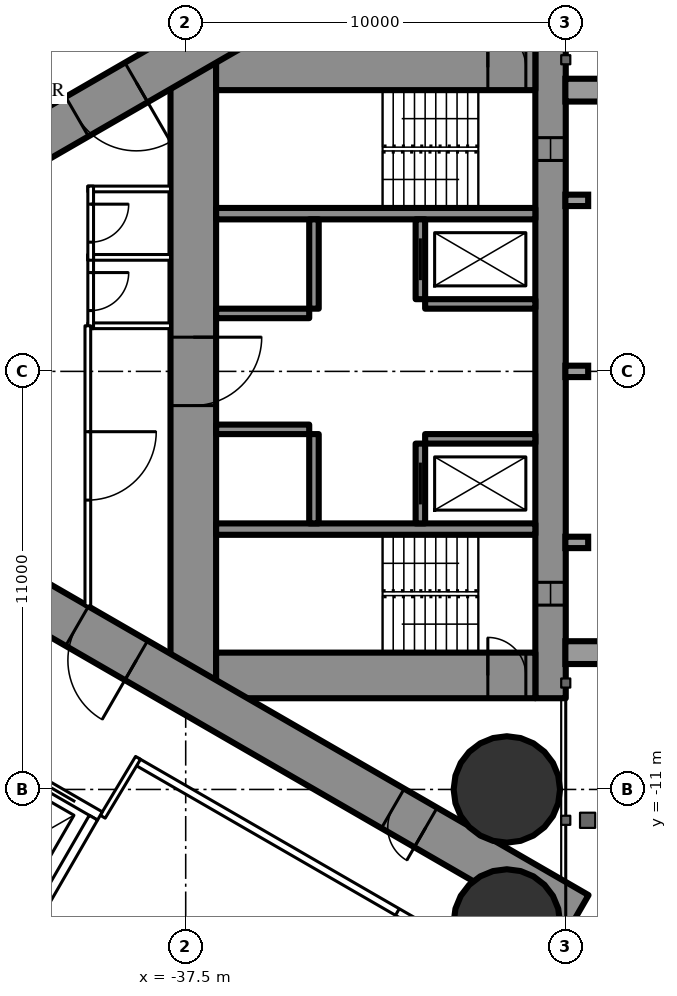
"""IFC4 building model, lengths in metres.
Left out: names, types, materials, properties, quantities, classifications, styles, units other than length and angle.
Written with IfcOpenShell. Run it as: python <this file> out.ifc"""

import sys

from ifc_helpers import new_model, si_unit, direction, frame, frame_2d, origin, origin_2d, place, context, subcontext, project, spatial, rectangle, circle, extrude, element, fill, save


model = new_model("IFC4")
c1 = context("Model", 3, precision=1e-05, world=origin(), true_north=direction((0.0, 1.0)))
c2 = subcontext(c1, "Body", "Model", "MODEL_VIEW")
j1 = project(units=[si_unit("LENGTHUNIT", "METRE"), si_unit("PLANEANGLEUNIT", "RADIAN")], contexts=[c1])
p1 = place(None, origin())
s1 = spatial("IfcSite", under=j1, at=p1, CompositionType="ELEMENT")
p2 = place(p1, origin())
s2 = spatial("IfcBuilding", under=s1, at=p2, CompositionType="ELEMENT")
p3 = place(p2, frame((0.0, 0.0, 166.8)))
s3 = spatial("IfcBuildingStorey", under=s2, at=p3, CompositionType="ELEMENT", Elevation=166.8)
for number, where, z_axis, x_axis in (
    (1, (-29.05, -11.0, 0.0), (0.0, 0.0, 1.0), (1.0, 0.0, 0.0)),
    (2, (-29.05, -14.5, 0.0), (0.0, 0.0, 1.0), (1.0, 0.0, 0.0)),
):
    element("IfcColumn", number, at=place(p3, frame(where, z_axis=z_axis, x_axis=x_axis)), inside=s3, PredefinedType="COLUMN", context=c2, shape_type="SweptSolid", body=[
        extrude(circle(Radius=1.4, at=origin_2d()), origin(), (0.0, 0.0, 1.0), 3.5),
    ])
p4 = place(p3, frame((-27.9, 8.6, 0.0), z_axis=(0.0, 0.0, 1.0), x_axis=(0.0, -1.0, 0.0)))
e3 = element("IfcWall", 3, at=p4, inside=s3, PredefinedType="SHEAR", context=c2, shape_type="SweptSolid", body=[
    extrude(rectangle(XDim=17.2, YDim=0.8, at=frame_2d((8.6, 0.0))), origin(), (0.0, 0.0, 1.0), 3.5),
])
p5 = place(p4, frame((2.45, 0.0, 0.6)))
e4 = element("IfcOpeningElement", 4, at=p5, cuts=e3, PredefinedType="OPENING", context=c2, shape_type="SweptSolid", body=[
    extrude(rectangle(XDim=0.6, YDim=2.1, at=frame_2d((0.3, 1.05))), frame((0.0, 0.41, 0.0), z_axis=(0.0, -1.0, 0.0), x_axis=(1.0, 0.0, 0.0)), (0.0, 0.0, 1.0), 0.82),
])
p6 = place(p4, frame((14.15, 0.0, 0.6)))
e5 = element("IfcOpeningElement", 5, at=p6, cuts=e3, PredefinedType="OPENING", context=c2, shape_type="SweptSolid", body=[
    extrude(rectangle(XDim=0.6, YDim=2.1, at=frame_2d((0.3, 1.05))), frame((0.0, 0.41, 0.0), z_axis=(0.0, -1.0, 0.0), x_axis=(1.0, 0.0, 0.0)), (0.0, 0.0, 1.0), 0.82),
])
p7 = place(p3, frame((-37.3, 8.6, 0.0), z_axis=(0.0, 0.0, 1.0), x_axis=(0.0, -1.0, 0.0)))
e6 = element("IfcWall", 6, at=p7, inside=s3, PredefinedType="SHEAR", context=c2, shape_type="SweptSolid", body=[
    extrude(rectangle(XDim=17.2, YDim=1.2, at=frame_2d((8.6, 0.0))), origin(), (0.0, 0.0, 1.0), 3.5),
])
p8 = place(p7, frame((7.7, 0.0, 0.0)))
e7 = element("IfcOpeningElement", 7, at=p8, cuts=e6, PredefinedType="OPENING", context=c2, shape_type="SweptSolid", body=[
    extrude(rectangle(XDim=1.8, YDim=2.2, at=frame_2d((0.9, 1.1))), frame((0.0, 0.61, 0.0), z_axis=(0.0, -1.0, 0.0), x_axis=(1.0, 0.0, 0.0)), (0.0, 0.0, 1.0), 1.22),
])
p9 = place(p3, frame((-28.3, 8.0, 0.0), z_axis=(0.0, 0.0, 1.0), x_axis=(-1.0, 0.0, 0.0)))
e8 = element("IfcWall", 8, at=p9, inside=s3, PredefinedType="SHEAR", context=c2, shape_type="SweptSolid", body=[
    extrude(rectangle(XDim=8.4, YDim=1.2, at=frame_2d((4.2, 0.0))), origin(), (0.0, 0.0, 1.0), 3.5),
])
p10 = place(p9, frame((0.25, 0.0, 0.0)))
e9 = element("IfcOpeningElement", 9, at=p10, cuts=e8, PredefinedType="OPENING", context=c2, shape_type="SweptSolid", body=[
    extrude(rectangle(XDim=1.0, YDim=2.2, at=frame_2d((0.5, 1.1))), frame((0.0, 0.61, 0.0), z_axis=(0.0, -1.0, 0.0), x_axis=(1.0, 0.0, 0.0)), (0.0, 0.0, 1.0), 1.22),
])
p11 = place(p3, frame((-28.3, -8.0, 0.0), z_axis=(0.0, 0.0, 1.0), x_axis=(-1.0, 0.0, 0.0)))
e10 = element("IfcWall", 10, at=p11, inside=s3, PredefinedType="SHEAR", context=c2, shape_type="SweptSolid", body=[
    extrude(rectangle(XDim=8.4, YDim=1.2, at=frame_2d((4.2, 0.0))), origin(), (0.0, 0.0, 1.0), 3.5),
])
p12 = place(p11, frame((0.25, 0.0, 0.0)))
e11 = element("IfcOpeningElement", 11, at=p12, cuts=e10, PredefinedType="OPENING", context=c2, shape_type="SweptSolid", body=[
    extrude(rectangle(XDim=1.0, YDim=2.2, at=frame_2d((0.5, 1.1))), frame((0.0, 0.61, 0.0), z_axis=(0.0, -1.0, 0.0), x_axis=(1.0, 0.0, 0.0)), (0.0, 0.0, 1.0), 1.22),
])
for number, where, z_axis, x_axis in (
    (12, (-28.3, 4.15, 0.0), (0.0, 0.0, 1.0), (-1.0, 0.0, 0.0)),
    (13, (-28.3, -4.15, 0.0), (0.0, 0.0, 1.0), (-1.0, 0.0, 0.0)),
):
    element("IfcWall", number, at=place(p3, frame(where, z_axis=z_axis, x_axis=x_axis)), inside=s3, PredefinedType="SHEAR", context=c2, shape_type="SweptSolid", body=[
        extrude(rectangle(XDim=8.4, YDim=0.3, at=frame_2d((4.2, 0.0))), origin(), (0.0, 0.0, 1.0), 3.5),
    ])
p13 = place(p3, frame((-31.325, 4.0, 0.0), z_axis=(0.0, 0.0, 1.0), x_axis=(0.0, -1.0, 0.0)))
e14 = element("IfcWall", 14, at=p13, inside=s3, PredefinedType="SHEAR", context=c2, shape_type="SweptSolid", body=[
    extrude(rectangle(XDim=2.1, YDim=0.25, at=frame_2d((1.05, 0.0))), origin(), (0.0, 0.0, 1.0), 3.5),
])
p14 = place(p13, frame((0.5, 0.0, 0.0)))
e15 = element("IfcOpeningElement", 15, at=p14, cuts=e14, PredefinedType="OPENING", context=c2, shape_type="SweptSolid", body=[
    extrude(rectangle(XDim=1.1, YDim=2.2, at=frame_2d((0.55, 1.1))), frame((0.0, 0.135, 0.0), z_axis=(0.0, -1.0, 0.0), x_axis=(1.0, 0.0, 0.0)), (0.0, 0.0, 1.0), 0.27),
])
p15 = place(p3, frame((-34.125, 4.0, 0.0), z_axis=(0.0, 0.0, 1.0), x_axis=(0.0, -1.0, 0.0)))
e16 = element("IfcWall", 16, at=p15, inside=s3, PredefinedType="SHEAR", context=c2, shape_type="SweptSolid", body=[
    extrude(rectangle(XDim=2.35, YDim=0.25, at=frame_2d((1.175, 0.0))), origin(), (0.0, 0.0, 1.0), 3.5),
])
p16 = place(p3, frame((-28.3, 1.775, 0.0), z_axis=(0.0, 0.0, 1.0), x_axis=(-1.0, 0.0, 0.0)))
e17 = element("IfcWall", 17, at=p16, inside=s3, PredefinedType="SHEAR", context=c2, shape_type="SweptSolid", body=[
    extrude(rectangle(XDim=2.9, YDim=0.25, at=frame_2d((1.45, 0.0))), origin(), (0.0, 0.0, 1.0), 3.5),
])
p17 = place(p3, frame((-34.25, 1.525, 0.0), z_axis=(0.0, 0.0, 1.0), x_axis=(-1.0, 0.0, 0.0)))
e18 = element("IfcWall", 18, at=p17, inside=s3, PredefinedType="SHEAR", context=c2, shape_type="SweptSolid", body=[
    extrude(rectangle(XDim=2.45, YDim=0.25, at=frame_2d((1.225, 0.0))), origin(), (0.0, 0.0, 1.0), 3.5),
])
p18 = place(p3, frame((-31.325, -1.9, 0.0), z_axis=(0.0, 0.0, 1.0), x_axis=(0.0, -1.0, 0.0)))
e19 = element("IfcWall", 19, at=p18, inside=s3, PredefinedType="SHEAR", context=c2, shape_type="SweptSolid", body=[
    extrude(rectangle(XDim=2.1, YDim=0.25, at=frame_2d((1.05, 0.0))), origin(), (0.0, 0.0, 1.0), 3.5),
])
p19 = place(p18, frame((0.5, 0.0, 0.0)))
e20 = element("IfcOpeningElement", 20, at=p19, cuts=e19, PredefinedType="OPENING", context=c2, shape_type="SweptSolid", body=[
    extrude(rectangle(XDim=1.1, YDim=2.2, at=frame_2d((0.55, 1.1))), frame((0.0, 0.135, 0.0), z_axis=(0.0, -1.0, 0.0), x_axis=(1.0, 0.0, 0.0)), (0.0, 0.0, 1.0), 0.27),
])
p20 = place(p3, frame((-34.125, -1.65, 0.0), z_axis=(0.0, 0.0, 1.0), x_axis=(0.0, -1.0, 0.0)))
e21 = element("IfcWall", 21, at=p20, inside=s3, PredefinedType="SHEAR", context=c2, shape_type="SweptSolid", body=[
    extrude(rectangle(XDim=2.35, YDim=0.25, at=frame_2d((1.175, 0.0))), origin(), (0.0, 0.0, 1.0), 3.5),
])
p21 = place(p3, frame((-28.3, -1.775, 0.0), z_axis=(0.0, 0.0, 1.0), x_axis=(-1.0, 0.0, 0.0)))
e22 = element("IfcWall", 22, at=p21, inside=s3, PredefinedType="SHEAR", context=c2, shape_type="SweptSolid", body=[
    extrude(rectangle(XDim=2.9, YDim=0.25, at=frame_2d((1.45, 0.0))), origin(), (0.0, 0.0, 1.0), 3.5),
])
p22 = place(p3, frame((-34.25, -1.525, 0.0), z_axis=(0.0, 0.0, 1.0), x_axis=(-1.0, 0.0, 0.0)))
e23 = element("IfcWall", 23, at=p22, inside=s3, PredefinedType="SHEAR", context=c2, shape_type="SweptSolid", body=[
    extrude(rectangle(XDim=2.45, YDim=0.25, at=frame_2d((1.225, 0.0))), origin(), (0.0, 0.0, 1.0), 3.5),
])
p23 = place(p3, frame((-27.2, 14.3, 0.0), z_axis=(0.0, 0.0, 1.0), x_axis=(-0.866026593062, -0.499997940104, 0.0)))
e24 = element("IfcWall", 24, at=p23, inside=s3, PredefinedType="SHEAR", context=c2, shape_type="SweptSolid", body=[
    extrude(rectangle(XDim=28.946, YDim=1.2, at=frame_2d((14.473, 0.0))), origin(), (0.0, 0.0, 1.0), 3.5),
])
p24 = place(p23, frame((4.6, 0.0, 0.0)))
e25 = element("IfcOpeningElement", 25, at=p24, cuts=e24, PredefinedType="OPENING", context=c2, shape_type="SweptSolid", body=[
    extrude(rectangle(XDim=1.0, YDim=2.2, at=frame_2d((0.5, 1.1))), frame((0.0, 0.61, 0.0), z_axis=(0.0, -1.0, 0.0), x_axis=(1.0, 0.0, 0.0)), (0.0, 0.0, 1.0), 1.22),
])
p25 = place(p23, frame((13.395, 0.0, 0.0)))
e26 = element("IfcOpeningElement", 26, at=p25, cuts=e24, PredefinedType="OPENING", context=c2, shape_type="SweptSolid", body=[
    extrude(rectangle(XDim=1.8, YDim=2.2, at=frame_2d((0.9, 1.1))), frame((0.0, 0.61, 0.0), z_axis=(0.0, -1.0, 0.0), x_axis=(1.0, 0.0, 0.0)), (0.0, 0.0, 1.0), 1.22),
])
p26 = place(p3, frame((-27.2, -14.3, 0.0), z_axis=(0.0, 0.0, 1.0), x_axis=(-0.866024021859, 0.500002393557, 0.0)))
e27 = element("IfcWall", 27, at=p26, inside=s3, PredefinedType="SHEAR", context=c2, shape_type="SweptSolid", body=[
    extrude(rectangle(XDim=27.907, YDim=1.2, at=frame_2d((13.954, 0.0))), origin(), (0.0, 0.0, 1.0), 3.5),
])
p27 = place(p26, frame((4.6, 0.0, 0.0)))
e28 = element("IfcOpeningElement", 28, at=p27, cuts=e27, PredefinedType="OPENING", context=c2, shape_type="SweptSolid", body=[
    extrude(rectangle(XDim=1.0, YDim=2.2, at=frame_2d((0.5, 1.1))), frame((0.0, 0.61, 0.0), z_axis=(0.0, -1.0, 0.0), x_axis=(1.0, 0.0, 0.0)), (0.0, 0.0, 1.0), 1.22),
])
p28 = place(p26, frame((13.395, 0.0, 0.0)))
e29 = element("IfcOpeningElement", 29, at=p28, cuts=e27, PredefinedType="OPENING", context=c2, shape_type="SweptSolid", body=[
    extrude(rectangle(XDim=1.8, YDim=2.2, at=frame_2d((0.9, 1.1))), frame((0.0, 0.61, 0.0), z_axis=(0.0, -1.0, 0.0), x_axis=(1.0, 0.0, 0.0)), (0.0, 0.0, 1.0), 1.22),
])
p29 = place(p3, frame((-27.86, -16.575, 0.0), z_axis=(0.0, 0.0, 1.0), x_axis=(-0.866027756871, 0.499995924312, 0.0)))
e30 = element("IfcWall", 30, at=p29, inside=s3, PredefinedType="PARTITIONING", context=c2, shape_type="SweptSolid", body=[
    extrude(rectangle(XDim=12.622, YDim=0.2, at=frame_2d((6.311, 0.0))), origin(), (0.0, 0.0, 1.0), 3.25),
])
p30 = place(p29, frame((3.75, 0.0, 0.0)))
e31 = element("IfcOpeningElement", 31, at=p30, cuts=e30, PredefinedType="OPENING", context=c2, shape_type="SweptSolid", body=[
    extrude(rectangle(XDim=0.95, YDim=2.2, at=frame_2d((0.475, 1.1))), frame((0.0, 0.11, 0.0), z_axis=(0.0, -1.0, 0.0), x_axis=(1.0, 0.0, 0.0)), (0.0, 0.0, 1.0), 0.22),
])
p31 = place(p3, frame((-39.683, -11.718, 0.0), z_axis=(0.0, 0.0, 1.0), x_axis=(0.514336634837, 0.857588377991, 0.0)))
e32 = element("IfcWall", 32, at=p31, inside=s3, PredefinedType="PARTITIONING", context=c2, shape_type="SweptSolid", body=[
    extrude(rectangle(XDim=1.805, YDim=0.15, at=frame_2d((0.903, 0.0))), origin(), (0.0, 0.0, 1.0), 3.25),
])
for number, where, z_axis, x_axis in (
    (33, (-37.9, 1.2, 0.0), (0.0, 0.0, 1.0), (-1.0, 0.0, 0.0)),
    (34, (-37.9, 3.0, 0.0), (0.0, 0.0, 1.0), (-1.0, 0.0, 0.0)),
    (35, (-37.9, 4.8, 0.0), (0.0, 0.0, 1.0), (-1.0, 0.0, 0.0)),
):
    element("IfcWall", number, at=place(p3, frame(where, z_axis=z_axis, x_axis=x_axis)), inside=s3, PredefinedType="PARTITIONING", context=c2, shape_type="SweptSolid", body=[
        extrude(rectangle(XDim=2.175, YDim=0.15, at=frame_2d((1.087, 0.0))), origin(), (0.0, 0.0, 1.0), 3.25),
    ])
p32 = place(p3, frame((-40.0, 3.075, 0.0), z_axis=(0.0, 0.0, 1.0), x_axis=(0.0, -1.0, 0.0)))
e36 = element("IfcWall", 36, at=p32, inside=s3, PredefinedType="PARTITIONING", context=c2, shape_type="SweptSolid", body=[
    extrude(rectangle(XDim=1.95, YDim=0.15, at=frame_2d((0.975, 0.0))), origin(), (0.0, 0.0, 1.0), 3.25),
])
p33 = place(p32, frame((0.475, 0.0, 0.0)))
e37 = element("IfcOpeningElement", 37, at=p33, cuts=e36, PredefinedType="OPENING", context=c2, shape_type="SweptSolid", body=[
    extrude(rectangle(XDim=1.0, YDim=2.2, at=frame_2d((0.5, 1.1))), frame((0.0, 0.085, 0.0), z_axis=(0.0, -1.0, 0.0), x_axis=(1.0, 0.0, 0.0)), (0.0, 0.0, 1.0), 0.17),
])
p34 = place(p3, frame((-40.0, 4.875, 0.0), z_axis=(0.0, 0.0, 1.0), x_axis=(0.0, -1.0, 0.0)))
e38 = element("IfcWall", 38, at=p34, inside=s3, PredefinedType="PARTITIONING", context=c2, shape_type="SweptSolid", body=[
    extrude(rectangle(XDim=1.95, YDim=0.15, at=frame_2d((0.975, 0.0))), origin(), (0.0, 0.0, 1.0), 3.25),
])
p35 = place(p34, frame((0.475, 0.0, 0.0)))
e39 = element("IfcOpeningElement", 39, at=p35, cuts=e38, PredefinedType="OPENING", context=c2, shape_type="SweptSolid", body=[
    extrude(rectangle(XDim=1.0, YDim=2.2, at=frame_2d((0.5, 1.1))), frame((0.0, 0.085, 0.0), z_axis=(0.0, -1.0, 0.0), x_axis=(1.0, 0.0, 0.0)), (0.0, 0.0, 1.0), 0.17),
])
p36 = place(p3, frame((-40.075, 1.2, 0.0), z_axis=(0.0, 0.0, 1.0), x_axis=(0.0, -1.0, 0.0)))
e40 = element("IfcWall", 40, at=p36, inside=s3, PredefinedType="PARTITIONING", context=c2, shape_type="SweptSolid", body=[
    extrude(rectangle(XDim=7.374, YDim=0.15, at=frame_2d((3.687, 0.0))), origin(), (0.0, 0.0, 1.0), 3.25),
])
p37 = place(p36, frame((2.787, 0.0, 0.0)))
e41 = element("IfcOpeningElement", 41, at=p37, cuts=e40, PredefinedType="OPENING", context=c2, shape_type="SweptSolid", body=[
    extrude(rectangle(XDim=1.8, YDim=2.2, at=frame_2d((0.9, 1.1))), frame((0.0, 0.085, 0.0), z_axis=(0.0, -1.0, 0.0), x_axis=(1.0, 0.0, 0.0)), (0.0, 0.0, 1.0), 0.17),
])
p38 = place(p3, frame((-39.758, -11.697, 0.0), z_axis=(0.0, 0.0, 1.0), x_axis=(-0.866024194504, 0.500002094529, 0.0)))
e42 = element("IfcWall", 42, at=p38, inside=s3, PredefinedType="PARTITIONING", context=c2, shape_type="SweptSolid", body=[
    extrude(rectangle(XDim=6.6, YDim=0.25, at=frame_2d((3.3, 0.0))), origin(), (0.0, 0.0, 1.0), 3.25),
])
p39 = place(p38, frame((0.75, 0.0, 0.0)))
e43 = element("IfcOpeningElement", 43, at=p39, cuts=e42, PredefinedType="OPENING", context=c2, shape_type="SweptSolid", body=[
    extrude(rectangle(XDim=1.1, YDim=2.2, at=frame_2d((0.55, 1.1))), frame((0.0, 0.135, 0.0), z_axis=(0.0, -1.0, 0.0), x_axis=(1.0, 0.0, 0.0)), (0.0, 0.0, 1.0), 0.27),
])
p40 = place(p38, frame((2.75, 0.0, 0.0)))
e44 = element("IfcOpeningElement", 44, at=p40, cuts=e42, PredefinedType="OPENING", context=c2, shape_type="SweptSolid", body=[
    extrude(rectangle(XDim=1.1, YDim=2.2, at=frame_2d((0.55, 1.1))), frame((0.0, 0.135, 0.0), z_axis=(0.0, -1.0, 0.0), x_axis=(1.0, 0.0, 0.0)), (0.0, 0.0, 1.0), 0.27),
])
p41 = place(p38, frame((4.75, 0.0, 0.0)))
e45 = element("IfcOpeningElement", 45, at=p41, cuts=e42, PredefinedType="OPENING", context=c2, shape_type="SweptSolid", body=[
    extrude(rectangle(XDim=1.1, YDim=2.2, at=frame_2d((0.55, 1.1))), frame((0.0, 0.135, 0.0), z_axis=(0.0, -1.0, 0.0), x_axis=(1.0, 0.0, 0.0)), (0.0, 0.0, 1.0), 0.27),
])
p42 = place(p3, frame((-39.928, -11.743, 0.0), z_axis=(0.0, 0.0, 1.0), x_axis=(-0.499929347863, -0.866066190972, 0.0)))
e46 = element("IfcWall", 46, at=p42, inside=s3, PredefinedType="PARTITIONING", context=c2, shape_type="SweptSolid", body=[
    extrude(rectangle(XDim=3.201, YDim=0.25, at=frame_2d((1.6, 0.0))), origin(), (0.0, 0.0, 1.0), 3.25),
])
p43 = place(p30, origin())
e47 = element("IfcDoor", 47, at=p43, inside=s3, OperationType="SINGLE_SWING_LEFT", PredefinedType="DOOR", context=c2, shape_type="SweptSolid", body=[
    extrude(rectangle(XDim=0.95, YDim=2.2, at=frame_2d((0.475, 1.1))), frame((0.0, 0.025, 0.0), z_axis=(0.0, -1.0, 0.0), x_axis=(1.0, 0.0, 0.0)), (0.0, 0.0, 1.0), 0.05),
])
fill(e31, e47)
p44 = place(p33, origin())
e48 = element("IfcDoor", 48, at=p44, inside=s3, OperationType="SINGLE_SWING_LEFT", PredefinedType="DOOR", context=c2, shape_type="SweptSolid", body=[
    extrude(rectangle(XDim=1.0, YDim=2.2, at=frame_2d((0.5, 1.1))), frame((0.0, 0.025, 0.0), z_axis=(0.0, -1.0, 0.0), x_axis=(1.0, 0.0, 0.0)), (0.0, 0.0, 1.0), 0.05),
])
fill(e37, e48)
p45 = place(p35, origin())
e49 = element("IfcDoor", 49, at=p45, inside=s3, OperationType="SINGLE_SWING_LEFT", PredefinedType="DOOR", context=c2, shape_type="SweptSolid", body=[
    extrude(rectangle(XDim=1.0, YDim=2.2, at=frame_2d((0.5, 1.1))), frame((0.0, 0.025, 0.0), z_axis=(0.0, -1.0, 0.0), x_axis=(1.0, 0.0, 0.0)), (0.0, 0.0, 1.0), 0.05),
])
fill(e39, e49)
p46 = place(p37, origin())
e50 = element("IfcDoor", 50, at=p46, inside=s3, OperationType="DOUBLE_DOOR_SINGLE_SWING", PredefinedType="DOOR", context=c2, shape_type="SweptSolid", body=[
    extrude(rectangle(XDim=1.8, YDim=2.2, at=frame_2d((0.9, 1.1))), frame((0.0, 0.025, 0.0), z_axis=(0.0, -1.0, 0.0), x_axis=(1.0, 0.0, 0.0)), (0.0, 0.0, 1.0), 0.05),
])
fill(e41, e50)
p47 = place(p25, origin())
e51 = element("IfcDoor", 51, at=p47, inside=s3, OperationType="DOUBLE_DOOR_SINGLE_SWING", PredefinedType="DOOR", context=c2, shape_type="SweptSolid", body=[
    extrude(rectangle(XDim=1.8, YDim=2.2, at=frame_2d((0.9, 1.1))), frame((0.0, 0.025, 0.0), z_axis=(0.0, -1.0, 0.0), x_axis=(1.0, 0.0, 0.0)), (0.0, 0.0, 1.0), 0.05),
])
fill(e26, e51)
p48 = place(p27, origin())
e52 = element("IfcDoor", 52, at=p48, inside=s3, OperationType="SINGLE_SWING_LEFT", PredefinedType="DOOR", context=c2, shape_type="SweptSolid", body=[
    extrude(rectangle(XDim=1.0, YDim=2.2, at=frame_2d((0.5, 1.1))), frame((0.0, 0.025, 0.0), z_axis=(0.0, -1.0, 0.0), x_axis=(1.0, 0.0, 0.0)), (0.0, 0.0, 1.0), 0.05),
])
fill(e28, e52)
p49 = place(p28, origin())
e53 = element("IfcDoor", 53, at=p49, inside=s3, OperationType="DOUBLE_DOOR_SINGLE_SWING", PredefinedType="DOOR", context=c2, shape_type="SweptSolid", body=[
    extrude(rectangle(XDim=1.8, YDim=2.2, at=frame_2d((0.9, 1.1))), frame((0.0, 0.025, 0.0), z_axis=(0.0, -1.0, 0.0), x_axis=(1.0, 0.0, 0.0)), (0.0, 0.0, 1.0), 0.05),
])
fill(e29, e53)
p50 = place(p8, origin())
e54 = element("IfcDoor", 54, at=p50, inside=s3, OperationType="DOUBLE_DOOR_SINGLE_SWING", PredefinedType="DOOR", context=c2, shape_type="SweptSolid", body=[
    extrude(rectangle(XDim=1.8, YDim=2.2, at=frame_2d((0.9, 1.1))), frame((0.0, 0.025, 0.0), z_axis=(0.0, -1.0, 0.0), x_axis=(1.0, 0.0, 0.0)), (0.0, 0.0, 1.0), 0.05),
])
fill(e7, e54)
p51 = place(p10, origin())
e55 = element("IfcDoor", 55, at=p51, inside=s3, OperationType="SINGLE_SWING_RIGHT", PredefinedType="DOOR", context=c2, shape_type="SweptSolid", body=[
    extrude(rectangle(XDim=1.0, YDim=2.2, at=frame_2d((0.5, 1.1))), frame((0.0, 0.025, 0.0), z_axis=(0.0, -1.0, 0.0), x_axis=(1.0, 0.0, 0.0)), (0.0, 0.0, 1.0), 0.05),
])
fill(e9, e55)
p52 = place(p12, origin())
e56 = element("IfcDoor", 56, at=p52, inside=s3, OperationType="SINGLE_SWING_RIGHT", PredefinedType="DOOR", context=c2, shape_type="SweptSolid", body=[
    extrude(rectangle(XDim=1.0, YDim=2.2, at=frame_2d((0.5, 1.1))), frame((0.0, 0.025, 0.0), z_axis=(0.0, -1.0, 0.0), x_axis=(1.0, 0.0, 0.0)), (0.0, 0.0, 1.0), 0.05),
])
fill(e11, e56)
p53 = place(p14, origin())
e57 = element("IfcDoor", 57, at=p53, inside=s3, OperationType="SLIDING_TO_LEFT", PredefinedType="USERDEFINED", context=c2, shape_type="SweptSolid", body=[
    extrude(rectangle(XDim=1.1, YDim=2.2, at=frame_2d((0.55, 1.1))), frame((0.0, 0.025, 0.0), z_axis=(0.0, -1.0, 0.0), x_axis=(1.0, 0.0, 0.0)), (0.0, 0.0, 1.0), 0.05),
])
fill(e15, e57)
p54 = place(p19, origin())
e58 = element("IfcDoor", 58, at=p54, inside=s3, OperationType="SLIDING_TO_LEFT", PredefinedType="USERDEFINED", context=c2, shape_type="SweptSolid", body=[
    extrude(rectangle(XDim=1.1, YDim=2.2, at=frame_2d((0.55, 1.1))), frame((0.0, 0.025, 0.0), z_axis=(0.0, -1.0, 0.0), x_axis=(1.0, 0.0, 0.0)), (0.0, 0.0, 1.0), 0.05),
])
fill(e20, e58)
p55 = place(p39, origin())
e59 = element("IfcDoor", 59, at=p55, inside=s3, OperationType="DOUBLE_DOOR_SLIDING", PredefinedType="USERDEFINED", context=c2, shape_type="SweptSolid", body=[
    extrude(rectangle(XDim=1.1, YDim=2.2, at=frame_2d((0.55, 1.1))), frame((0.0, 0.025, 0.0), z_axis=(0.0, -1.0, 0.0), x_axis=(1.0, 0.0, 0.0)), (0.0, 0.0, 1.0), 0.05),
])
fill(e43, e59)
p56 = place(p5, origin())
e60 = element("IfcWindow", 60, at=p56, inside=s3, PartitioningType="SINGLE_PANEL", PredefinedType="WINDOW", context=c2, shape_type="SweptSolid", body=[
    extrude(rectangle(XDim=0.6, YDim=2.1, at=frame_2d((0.3, 1.05))), frame((0.0, 0.03, 0.0), z_axis=(0.0, -1.0, 0.0), x_axis=(1.0, 0.0, 0.0)), (0.0, 0.0, 1.0), 0.06),
])
fill(e4, e60)
p57 = place(p6, origin())
e61 = element("IfcWindow", 61, at=p57, inside=s3, PartitioningType="SINGLE_PANEL", PredefinedType="WINDOW", context=c2, shape_type="SweptSolid", body=[
    extrude(rectangle(XDim=0.6, YDim=2.1, at=frame_2d((0.3, 1.05))), frame((0.0, 0.03, 0.0), z_axis=(0.0, -1.0, 0.0), x_axis=(1.0, 0.0, 0.0)), (0.0, 0.0, 1.0), 0.06),
])
fill(e5, e61)
save(model, sys.argv[1])
